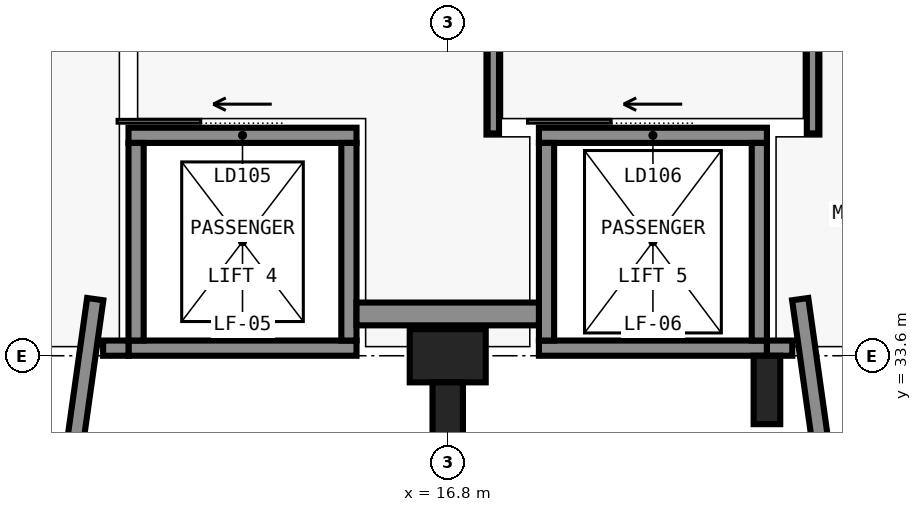
"""IFC4 building model, lengths in metres.
Left out: names, types, materials, properties, quantities, classifications, styles, units other than length and angle.
Written with IfcOpenShell. Run it as: python <this file> out.ifc"""

import sys

from ifc_helpers import new_model, si_unit, direction, frame, frame_2d, origin, origin_2d, place, context, subcontext, project, spatial, rectangle, extrude, element, fill, save


model = new_model("IFC4")
c1 = context("Model", 3, precision=1e-05, world=origin(), true_north=direction((0.0, 1.0)))
c2 = subcontext(c1, "Body", "Model", "MODEL_VIEW")
j1 = project(units=[si_unit("LENGTHUNIT", "METRE"), si_unit("PLANEANGLEUNIT", "RADIAN")], contexts=[c1])
p1 = place(None, origin())
s1 = spatial("IfcSite", under=j1, at=p1, CompositionType="ELEMENT")
p2 = place(p1, origin())
s2 = spatial("IfcBuilding", under=s1, at=p2, CompositionType="ELEMENT")
p3 = place(p2, frame((0.0, 0.0, 5.4)))
s3 = spatial("IfcBuildingStorey", under=s2, at=p3, CompositionType="ELEMENT", Elevation=5.4)
p4 = place(p3, frame((15.6, 33.7, 0.0), z_axis=(0.0, 0.0, 1.0), x_axis=(-1.0, 0.0, 0.0)))
e1 = element("IfcWall", 1, at=p4, inside=s3, PredefinedType="SHEAR", context=c2, shape_type="SweptSolid", body=[
    extrude(rectangle(XDim=3.0, YDim=0.2, at=frame_2d((1.5, 0.0))), origin(), (0.0, 0.0, 1.0), 4.8),
])
p5 = place(p3, frame((12.6, 36.5, 0.0), z_axis=(0.0, 0.0, 1.0), x_axis=(1.0, 0.0, 0.0)))
e2 = element("IfcWall", 2, at=p5, inside=s3, PredefinedType="SHEAR", context=c2, shape_type="SweptSolid", body=[
    extrude(rectangle(XDim=3.0, YDim=0.2, at=frame_2d((1.5, 0.0))), origin(), (0.0, 0.0, 1.0), 4.8),
])
p6 = place(p5, frame((0.95, 0.0, 0.0)))
e3 = element("IfcOpeningElement", 3, at=p6, cuts=e2, PredefinedType="OPENING", context=c2, shape_type="SweptSolid", body=[
    extrude(rectangle(XDim=1.1, YDim=2.1, at=frame_2d((0.55, 1.05))), frame((0.0, 0.11, 0.0), z_axis=(0.0, -1.0, 0.0), x_axis=(1.0, 0.0, 0.0)), (0.0, 0.0, 1.0), 0.22),
])
for number, where, z_axis, x_axis in (
    (4, (12.7, 33.8, 0.0), (0.0, 0.0, 1.0), (0.0, 1.0, 0.0)),
    (5, (15.5, 36.4, 0.0), (0.0, 0.0, 1.0), (0.0, -1.0, 0.0)),
):
    element("IfcWall", number, at=place(p3, frame(where, z_axis=z_axis, x_axis=x_axis)), inside=s3, PredefinedType="SHEAR", context=c2, shape_type="SweptSolid", body=[
        extrude(rectangle(XDim=2.6, YDim=0.2, at=frame_2d((1.3, 0.0))), origin(), (0.0, 0.0, 1.0), 4.8),
    ])
p7 = place(p3, frame((21.0, 33.7, 0.0), z_axis=(0.0, 0.0, 1.0), x_axis=(-1.0, 0.0, 0.0)))
e6 = element("IfcWall", 6, at=p7, inside=s3, PredefinedType="SHEAR", context=c2, shape_type="SweptSolid", body=[
    extrude(rectangle(XDim=3.0, YDim=0.2, at=frame_2d((1.5, 0.0))), origin(), (0.0, 0.0, 1.0), 4.8),
])
p8 = place(p3, frame((18.0, 36.5, 0.0), z_axis=(0.0, 0.0, 1.0), x_axis=(1.0, 0.0, 0.0)))
e7 = element("IfcWall", 7, at=p8, inside=s3, PredefinedType="SHEAR", context=c2, shape_type="SweptSolid", body=[
    extrude(rectangle(XDim=3.0, YDim=0.2, at=frame_2d((1.5, 0.0))), origin(), (0.0, 0.0, 1.0), 4.8),
])
p9 = place(p8, frame((0.95, 0.0, 0.0)))
e8 = element("IfcOpeningElement", 8, at=p9, cuts=e7, PredefinedType="OPENING", context=c2, shape_type="SweptSolid", body=[
    extrude(rectangle(XDim=1.1, YDim=2.1, at=frame_2d((0.55, 1.05))), frame((0.0, 0.11, 0.0), z_axis=(0.0, -1.0, 0.0), x_axis=(1.0, 0.0, 0.0)), (0.0, 0.0, 1.0), 0.22),
])
for number, where, z_axis, x_axis in (
    (9, (18.1, 33.8, 0.0), (0.0, 0.0, 1.0), (0.0, 1.0, 0.0)),
    (10, (20.9, 36.4, 0.0), (0.0, 0.0, 1.0), (0.0, -1.0, 0.0)),
):
    element("IfcWall", number, at=place(p3, frame(where, z_axis=z_axis, x_axis=x_axis)), inside=s3, PredefinedType="SHEAR", context=c2, shape_type="SweptSolid", body=[
        extrude(rectangle(XDim=2.6, YDim=0.2, at=frame_2d((1.3, 0.0))), origin(), (0.0, 0.0, 1.0), 4.8),
    ])
p10 = place(p3, frame((12.6, 33.7, 0.0), z_axis=(0.0, 0.0, 1.0), x_axis=(-1.0, 0.0, 0.0)))
e11 = element("IfcWall", 11, at=p10, inside=s3, PredefinedType="SHEAR", context=c2, shape_type="SweptSolid", body=[
    extrude(rectangle(XDim=0.334, YDim=0.2, at=frame_2d((0.167, 0.0))), origin(), (0.0, 0.0, 1.0), 4.8),
])
p11 = place(p3, frame((21.334, 33.7, 0.0), z_axis=(0.0, 0.0, 1.0), x_axis=(-1.0, 0.0, 0.0)))
e12 = element("IfcWall", 12, at=p11, inside=s3, PredefinedType="SHEAR", context=c2, shape_type="SweptSolid", body=[
    extrude(rectangle(XDim=0.334, YDim=0.2, at=frame_2d((0.167, 0.0))), origin(), (0.0, 0.0, 1.0), 4.8),
])
p12 = place(p3, frame((16.8, 33.6, 0.0), z_axis=(0.0, 0.0, 1.0), x_axis=(1.0, 0.0, 0.0)))
e13 = element("IfcColumn", 13, at=p12, inside=s3, PredefinedType="COLUMN", context=c2, shape_type="SweptSolid", body=[
    extrude(rectangle(XDim=1.0, YDim=0.7, at=origin_2d()), origin(), (0.0, 0.0, 1.0), 4.8),
])
p13 = place(p3, frame((12.162, 34.345, 0.0), z_axis=(0.0, 0.0, 1.0), x_axis=(-0.139120311566, -0.990275486372, 0.0)))
e14 = element("IfcWall", 14, at=p13, inside=s3, PredefinedType="SOLIDWALL", context=c2, shape_type="SweptSolid", body=[
    extrude(rectangle(XDim=2.169, YDim=0.215, at=frame_2d((1.084, 0.0))), origin(), (0.0, 0.0, 1.0), 4.5),
])
p14 = place(p3, frame((21.438, 34.345, 0.0), z_axis=(0.0, 0.0, 1.0), x_axis=(0.139230687381, -0.99025997379, 0.0)))
e15 = element("IfcWall", 15, at=p14, inside=s3, PredefinedType="SOLIDWALL", context=c2, shape_type="SweptSolid", body=[
    extrude(rectangle(XDim=2.169, YDim=0.215, at=frame_2d((1.084, 0.0))), origin(), (0.0, 0.0, 1.0), 4.5),
])
p15 = place(p3, frame((18.0, 34.15, 0.0), z_axis=(0.0, 0.0, 1.0), x_axis=(-1.0, 0.0, 0.0)))
e16 = element("IfcWall", 16, at=p15, inside=s3, PredefinedType="SOLIDWALL", context=c2, shape_type="SweptSolid", body=[
    extrude(rectangle(XDim=2.4, YDim=0.3, at=frame_2d((1.2, 0.0))), origin(), (0.0, 0.0, 1.0), 4.5),
])
p16 = place(p3, frame((16.8, 32.65, 0.0), z_axis=(0.0, 0.0, 1.0), x_axis=(1.0, 0.0, 0.0)))
e17 = element("IfcColumn", 17, at=p16, inside=s3, PredefinedType="PILASTER", context=c2, shape_type="SweptSolid", body=[
    extrude(rectangle(XDim=0.4, YDim=1.2, at=origin_2d()), origin(), (0.0, 0.0, 1.0), 4.8),
])
p17 = place(p3, frame((21.0, 33.15, 0.0), z_axis=(0.0, 0.0, 1.0), x_axis=(1.0, 0.0, 0.0)))
e18 = element("IfcColumn", 18, at=p17, inside=s3, PredefinedType="PILASTER", context=c2, shape_type="SweptSolid", body=[
    extrude(rectangle(XDim=0.35, YDim=0.9, at=origin_2d()), origin(), (0.0, 0.0, 1.0), 4.8),
])
p18 = place(p3, frame((17.4, 36.525, 0.0), z_axis=(0.0, 0.0, 1.0), x_axis=(0.0, 1.0, 0.0)))
e19 = element("IfcWall", 19, at=p18, inside=s3, PredefinedType="SOLIDWALL", context=c2, shape_type="SweptSolid", body=[
    extrude(rectangle(XDim=1.8, YDim=0.15, at=frame_2d((0.9, 0.0))), origin(), (0.0, 0.0, 1.0), 4.5),
])
p19 = place(p3, frame((21.6, 36.525, 0.0), z_axis=(0.0, 0.0, 1.0), x_axis=(0.0, 1.0, 0.0)))
e20 = element("IfcWall", 20, at=p19, inside=s3, PredefinedType="SOLIDWALL", context=c2, shape_type="SweptSolid", body=[
    extrude(rectangle(XDim=3.0, YDim=0.15, at=frame_2d((1.5, 0.0))), origin(), (0.0, 0.0, 1.0), 4.5),
])
p20 = place(p6, origin())
e21 = element("IfcDoor", 21, at=p20, inside=s3, OperationType="SLIDING_TO_LEFT", PredefinedType="DOOR", context=c2, shape_type="SweptSolid", body=[
    extrude(rectangle(XDim=1.1, YDim=2.1, at=frame_2d((0.55, 1.05))), frame((0.0, 0.025, 0.0), z_axis=(0.0, -1.0, 0.0), x_axis=(1.0, 0.0, 0.0)), (0.0, 0.0, 1.0), 0.05),
])
fill(e3, e21)
p21 = place(p9, origin())
e22 = element("IfcDoor", 22, at=p21, inside=s3, OperationType="SLIDING_TO_LEFT", PredefinedType="DOOR", context=c2, shape_type="SweptSolid", body=[
    extrude(rectangle(XDim=1.1, YDim=2.1, at=frame_2d((0.55, 1.05))), frame((0.0, 0.025, 0.0), z_axis=(0.0, -1.0, 0.0), x_axis=(1.0, 0.0, 0.0)), (0.0, 0.0, 1.0), 0.05),
])
fill(e8, e22)
save(model, sys.argv[1])
